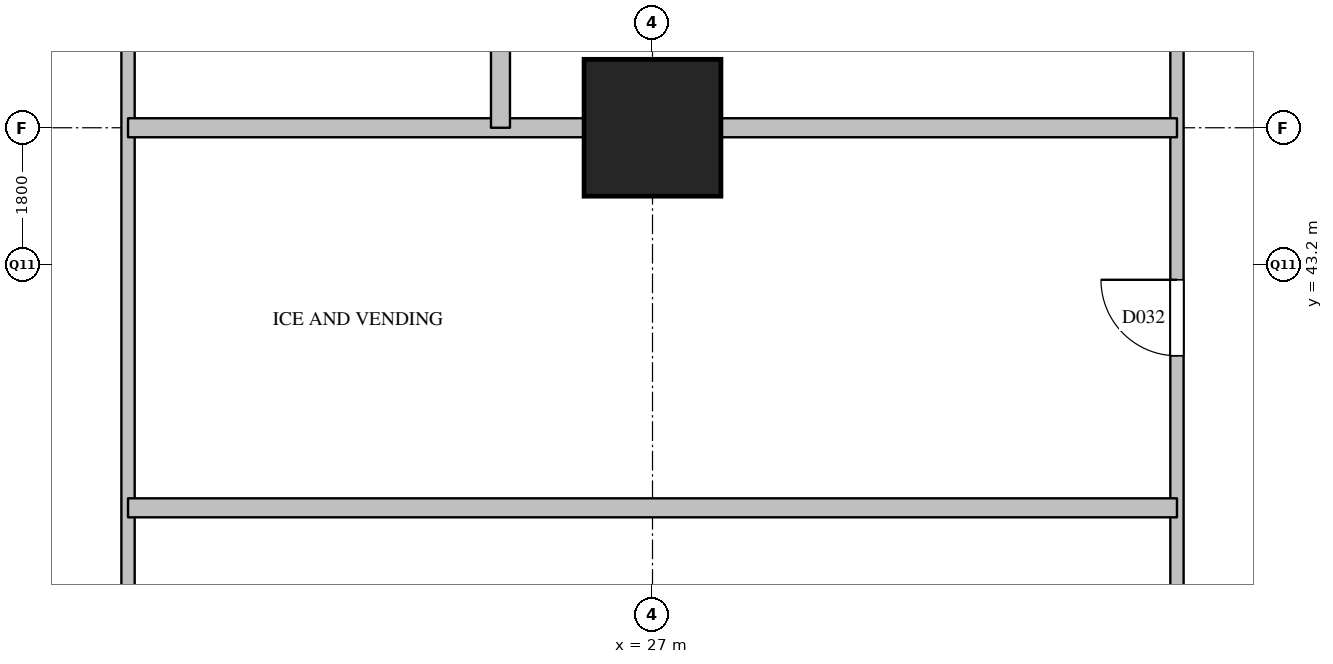
"""IFC4 building model, lengths in metres.
Left out: names, types, materials, properties, quantities, classifications, styles, units other than length and angle.
Written with IfcOpenShell. Run it as: python <this file> out.ifc"""

import sys

from ifc_helpers import new_model, si_unit, direction, frame, frame_2d, origin, origin_2d, place, context, subcontext, project, spatial, rectangle, extrude, element, fill, save


model = new_model("IFC4")
c1 = context("Model", 3, precision=1e-05, world=origin(), true_north=direction((0.0, 1.0)))
c2 = subcontext(c1, "Body", "Model", "MODEL_VIEW")
j1 = project(units=[si_unit("LENGTHUNIT", "METRE"), si_unit("PLANEANGLEUNIT", "RADIAN")], contexts=[c1])
p1 = place(None, origin())
s1 = spatial("IfcSite", under=j1, at=p1, CompositionType="ELEMENT")
p2 = place(p1, origin())
s2 = spatial("IfcBuilding", under=s1, at=p2, CompositionType="ELEMENT")
p3 = place(p2, frame((0.0, 0.0, 85.4)))
s3 = spatial("IfcBuildingStorey", under=s2, at=p3, CompositionType="ELEMENT", Elevation=85.4)
p4 = place(p3, frame((27.0, 45.0, 0.0), z_axis=(0.0, 0.0, 1.0), x_axis=(1.0, 0.0, 0.0)))
e1 = element("IfcColumn", 1, at=p4, inside=s3, PredefinedType="COLUMN", context=c2, shape_type="SweptSolid", body=[
    extrude(rectangle(XDim=1.8, YDim=1.8, at=origin_2d()), origin(), (0.0, 0.0, 1.0), 3.8),
])
p5 = place(p3, frame((20.1, 28.5, 0.0), z_axis=(0.0, 0.0, 1.0), x_axis=(0.0, 1.0, 0.0)))
e2 = element("IfcWall", 2, at=p5, inside=s3, PredefinedType="PARTITIONING", context=c2, shape_type="SweptSolid", body=[
    extrude(rectangle(XDim=23.6, YDim=0.175, at=frame_2d((11.8, 0.0))), origin(), (0.0, 0.0, 1.0), 3.5),
])
p6 = place(p5, frame((2.8, 0.0, 0.0)))
e3 = element("IfcOpeningElement", 3, at=p6, cuts=e2, PredefinedType="OPENING", context=c2, shape_type="SweptSolid", body=[
    extrude(rectangle(XDim=0.9, YDim=2.1, at=frame_2d((0.45, 1.05))), frame((0.0, 0.097, 0.0), z_axis=(0.0, -1.0, 0.0), x_axis=(1.0, 0.0, 0.0)), (0.0, 0.0, 1.0), 0.195),
])
p7 = place(p5, frame((19.6, 0.0, 0.0)))
e4 = element("IfcOpeningElement", 4, at=p7, cuts=e2, PredefinedType="OPENING", context=c2, shape_type="SweptSolid", body=[
    extrude(rectangle(XDim=0.9, YDim=2.1, at=frame_2d((0.45, 1.05))), frame((0.0, 0.097, 0.0), z_axis=(0.0, -1.0, 0.0), x_axis=(1.0, 0.0, 0.0)), (0.0, 0.0, 1.0), 0.195),
])
p8 = place(p3, frame((33.9, 28.52, 0.0), z_axis=(0.0, 0.0, 1.0), x_axis=(0.0, 1.0, 0.0)))
e5 = element("IfcWall", 5, at=p8, inside=s3, PredefinedType="PARTITIONING", context=c2, shape_type="SweptSolid", body=[
    extrude(rectangle(XDim=23.58, YDim=0.175, at=frame_2d((11.79, 0.0))), origin(), (0.0, 0.0, 1.0), 3.5),
])
p9 = place(p8, frame((2.74, 0.0, 0.0)))
e6 = element("IfcOpeningElement", 6, at=p9, cuts=e5, PredefinedType="OPENING", context=c2, shape_type="SweptSolid", body=[
    extrude(rectangle(XDim=1.0, YDim=2.1, at=frame_2d((0.5, 1.05))), frame((0.0, 0.097, 0.0), z_axis=(0.0, -1.0, 0.0), x_axis=(1.0, 0.0, 0.0)), (0.0, 0.0, 1.0), 0.195),
])
p10 = place(p8, frame((8.48, 0.0, 0.0)))
e7 = element("IfcOpeningElement", 7, at=p10, cuts=e5, PredefinedType="OPENING", context=c2, shape_type="SweptSolid", body=[
    extrude(rectangle(XDim=1.0, YDim=2.1, at=frame_2d((0.5, 1.05))), frame((0.0, 0.097, 0.0), z_axis=(0.0, -1.0, 0.0), x_axis=(1.0, 0.0, 0.0)), (0.0, 0.0, 1.0), 0.195),
])
p11 = place(p8, frame((13.48, 0.0, 0.0)))
e8 = element("IfcOpeningElement", 8, at=p11, cuts=e5, PredefinedType="OPENING", context=c2, shape_type="SweptSolid", body=[
    extrude(rectangle(XDim=1.0, YDim=2.1, at=frame_2d((0.5, 1.05))), frame((0.0, 0.097, 0.0), z_axis=(0.0, -1.0, 0.0), x_axis=(1.0, 0.0, 0.0)), (0.0, 0.0, 1.0), 0.195),
])
p12 = place(p3, frame((20.1, 40.0, 0.0), z_axis=(0.0, 0.0, 1.0), x_axis=(1.0, 0.0, 0.0)))
e9 = element("IfcWall", 9, at=p12, inside=s3, PredefinedType="PARTITIONING", context=c2, shape_type="SweptSolid", body=[
    extrude(rectangle(XDim=13.8, YDim=0.25, at=frame_2d((6.9, 0.0))), origin(), (0.0, 0.0, 1.0), 2.5),
])
p13 = place(p3, frame((20.1, 45.0, 0.0), z_axis=(0.0, 0.0, 1.0), x_axis=(1.0, 0.0, 0.0)))
e10 = element("IfcWall", 10, at=p13, inside=s3, PredefinedType="PARTITIONING", context=c2, shape_type="SweptSolid", body=[
    extrude(rectangle(XDim=13.8, YDim=0.25, at=frame_2d((6.9, 0.0))), origin(), (0.0, 0.0, 1.0), 3.5),
])
p14 = place(p3, frame((25.0, 45.0, 0.0), z_axis=(0.0, 0.0, 1.0), x_axis=(0.0, 1.0, 0.0)))
e11 = element("IfcWall", 11, at=p14, inside=s3, PredefinedType="PARTITIONING", context=c2, shape_type="SweptSolid", body=[
    extrude(rectangle(XDim=9.0, YDim=0.25, at=frame_2d((4.5, 0.0))), origin(), (0.0, 0.0, 1.0), 2.5),
])
p15 = place(p11, origin())
e12 = element("IfcDoor", 12, at=p15, inside=s3, OperationType="SINGLE_SWING_RIGHT", PredefinedType="DOOR", context=c2, shape_type="SweptSolid", body=[
    extrude(rectangle(XDim=1.0, YDim=2.1, at=frame_2d((0.5, 1.05))), frame((0.0, 0.025, 0.0), z_axis=(0.0, -1.0, 0.0), x_axis=(1.0, 0.0, 0.0)), (0.0, 0.0, 1.0), 0.05),
])
fill(e8, e12)
save(model, sys.argv[1])
